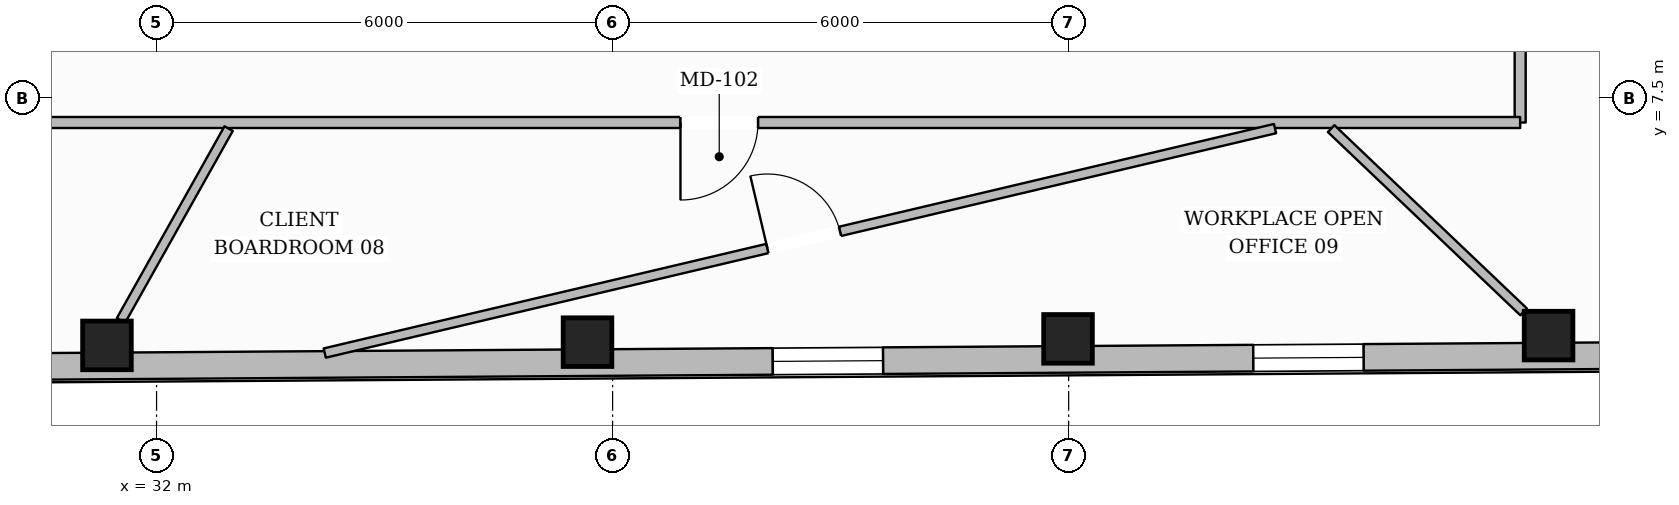
"""IFC4 building model, lengths in metres.
Left out: names, types, materials, properties, quantities, classifications, styles, units other than length and angle.
Written with IfcOpenShell. Run it as: python <this file> out.ifc"""

import sys

from ifc_helpers import new_model, si_unit, direction, frame, frame_2d, origin, origin_2d, place, context, subcontext, project, spatial, rectangle, hollow_rectangle, extrude, element, fill, save


model = new_model("IFC4")
c1 = context("Model", 3, precision=1e-05, world=origin(), true_north=direction((0.0, 1.0)))
c2 = subcontext(c1, "Body", "Model", "MODEL_VIEW")
j1 = project(units=[si_unit("LENGTHUNIT", "METRE"), si_unit("PLANEANGLEUNIT", "RADIAN")], contexts=[c1])
p1 = place(None, origin())
s1 = spatial("IfcSite", under=j1, at=p1, CompositionType="ELEMENT")
p2 = place(p1, origin())
s2 = spatial("IfcBuilding", under=s1, at=p2, CompositionType="ELEMENT")
p3 = place(p2, frame((0.0, 0.0, 211.2)))
s3 = spatial("IfcBuildingStorey", under=s2, at=p3, CompositionType="ELEMENT", Elevation=211.2)
for number, where, z_axis, x_axis in (
    (1, (31.348, 4.248, 0.0), (0.0, 0.0, 1.0), (1.0, 0.0, 0.0)),
    (2, (37.67, 4.29, 0.0), (0.0, 0.0, 1.0), (1.0, 0.0, 0.0)),
    (3, (43.992, 4.333, 0.0), (0.0, 0.0, 1.0), (1.0, 0.0, 0.0)),
    (4, (50.314, 4.376, 0.0), (0.0, 0.0, 1.0), (1.0, 0.0, 0.0)),
):
    element("IfcColumn", number, at=place(p3, frame(where, z_axis=z_axis, x_axis=x_axis)), inside=s3, PredefinedType="COLUMN", context=c2, shape_type="SweptSolid", body=[
        extrude(hollow_rectangle(XDim=0.64, YDim=0.64, WallThickness=0.028, at=origin_2d()), origin(), (0.0, 0.0, 1.0), 3.6),
    ])
p4 = place(p3, frame((57.109, 4.153, 0.0), z_axis=(0.0, 0.0, 1.0), x_axis=(-0.999976880016, -0.006799958314, 0.0)))
e5 = element("IfcWall", 5, at=p4, inside=s3, PredefinedType="STANDARD", context=c2, shape_type="SweptSolid", body=[
    extrude(rectangle(XDim=38.883, YDim=0.35, at=frame_2d((19.442, 0.0))), origin(), (0.0, 0.0, 1.0), 3.132),
])
p5 = place(p4, frame((34.519, 0.0, 0.65)))
e6 = element("IfcOpeningElement", 6, at=p5, cuts=e5, PredefinedType="OPENING", context=c2, shape_type="SweptSolid", body=[
    extrude(rectangle(XDim=1.45, YDim=1.75, at=frame_2d((0.725, 0.875))), frame((0.0, 0.185, 0.0), z_axis=(0.0, -1.0, 0.0), x_axis=(1.0, 0.0, 0.0)), (0.0, 0.0, 1.0), 0.37),
])
p6 = place(p4, frame((28.197, 0.0, 0.65)))
e7 = element("IfcOpeningElement", 7, at=p6, cuts=e5, PredefinedType="OPENING", context=c2, shape_type="SweptSolid", body=[
    extrude(rectangle(XDim=1.45, YDim=1.75, at=frame_2d((0.725, 0.875))), frame((0.0, 0.185, 0.0), z_axis=(0.0, -1.0, 0.0), x_axis=(1.0, 0.0, 0.0)), (0.0, 0.0, 1.0), 0.37),
])
p7 = place(p4, frame((15.552, 0.0, 0.65)))
e8 = element("IfcOpeningElement", 8, at=p7, cuts=e5, PredefinedType="OPENING", context=c2, shape_type="SweptSolid", body=[
    extrude(rectangle(XDim=1.45, YDim=1.75, at=frame_2d((0.725, 0.875))), frame((0.0, 0.185, 0.0), z_axis=(0.0, -1.0, 0.0), x_axis=(1.0, 0.0, 0.0)), (0.0, 0.0, 1.0), 0.37),
])
p8 = place(p4, frame((9.23, 0.0, 0.65)))
e9 = element("IfcOpeningElement", 9, at=p8, cuts=e5, PredefinedType="OPENING", context=c2, shape_type="SweptSolid", body=[
    extrude(rectangle(XDim=1.45, YDim=1.75, at=frame_2d((0.725, 0.875))), frame((0.0, 0.185, 0.0), z_axis=(0.0, -1.0, 0.0), x_axis=(1.0, 0.0, 0.0)), (0.0, 0.0, 1.0), 0.37),
])
p9 = place(p4, frame((2.908, 0.0, 0.65)))
e10 = element("IfcOpeningElement", 10, at=p9, cuts=e5, PredefinedType="OPENING", context=c2, shape_type="SweptSolid", body=[
    extrude(rectangle(XDim=1.45, YDim=1.75, at=frame_2d((0.725, 0.875))), frame((0.0, 0.185, 0.0), z_axis=(0.0, -1.0, 0.0), x_axis=(1.0, 0.0, 0.0)), (0.0, 0.0, 1.0), 0.37),
])
p10 = place(p3, frame((49.94, 15.1, 0.0), z_axis=(0.0, 0.0, 1.0), x_axis=(0.0, -1.0, 0.0)))
e11 = element("IfcWall", 11, at=p10, inside=s3, PredefinedType="PARTITIONING", context=c2, shape_type="SweptSolid", body=[
    extrude(rectangle(XDim=7.92, YDim=0.145, at=frame_2d((3.96, 0.0))), origin(), (0.0, 0.0, 1.0), 3.6),
])
p11 = place(p10, frame((3.26, 0.0, 0.0)))
e12 = element("IfcOpeningElement", 12, at=p11, cuts=e11, PredefinedType="OPENING", context=c2, shape_type="SweptSolid", body=[
    extrude(rectangle(XDim=1.4, YDim=2.2, at=frame_2d((0.7, 1.1))), frame((0.0, 0.083, 0.0), z_axis=(0.0, -1.0, 0.0), x_axis=(1.0, 0.0, 0.0)), (0.0, 0.0, 1.0), 0.165),
])
p12 = place(p3, frame((49.94, 7.18, 0.0), z_axis=(0.0, 0.0, 1.0), x_axis=(-1.0, 0.0, 0.0)))
e13 = element("IfcWall", 13, at=p12, inside=s3, PredefinedType="PARTITIONING", context=c2, shape_type="SweptSolid", body=[
    extrude(rectangle(XDim=23.88, YDim=0.145, at=frame_2d((11.94, 0.0))), origin(), (0.0, 0.0, 1.0), 3.6),
])
p13 = place(p12, frame((20.062, 0.0, 0.0)))
e14 = element("IfcOpeningElement", 14, at=p13, cuts=e13, PredefinedType="OPENING", context=c2, shape_type="SweptSolid", body=[
    extrude(rectangle(XDim=0.98, YDim=2.15, at=frame_2d((0.49, 1.075))), frame((0.0, 0.083, 0.0), z_axis=(0.0, -1.0, 0.0), x_axis=(1.0, 0.0, 0.0)), (0.0, 0.0, 1.0), 0.165),
])
p14 = place(p12, frame((10.027, 0.0, 0.0)))
e15 = element("IfcOpeningElement", 15, at=p14, cuts=e13, PredefinedType="OPENING", context=c2, shape_type="SweptSolid", body=[
    extrude(rectangle(XDim=1.02, YDim=2.15, at=frame_2d((0.51, 1.075))), frame((0.0, 0.083, 0.0), z_axis=(0.0, -1.0, 0.0), x_axis=(1.0, 0.0, 0.0)), (0.0, 0.0, 1.0), 0.165),
])
p15 = place(p3, frame((32.948, 7.1, 0.0), z_axis=(0.0, 0.0, 1.0), x_axis=(-0.489448120608, -0.872032417536, 0.0)))
e16 = element("IfcWall", 16, at=p15, inside=s3, PredefinedType="PARTITIONING", context=c2, shape_type="SweptSolid", body=[
    extrude(rectangle(XDim=2.895, YDim=0.125, at=frame_2d((1.447, 0.0))), origin(), (0.0, 0.0, 1.0), 3.6),
])
p16 = place(p3, frame((47.453, 7.1, 0.0), z_axis=(0.0, 0.0, 1.0), x_axis=(0.724245859296, -0.68954182998, 0.0)))
e17 = element("IfcWall", 17, at=p16, inside=s3, PredefinedType="PARTITIONING", context=c2, shape_type="SweptSolid", body=[
    extrude(rectangle(XDim=3.496, YDim=0.125, at=frame_2d((1.748, 0.0))), origin(), (0.0, 0.0, 1.0), 3.6),
])
p17 = place(p3, frame((34.213, 4.147, 0.0), z_axis=(0.0, 0.0, 1.0), x_axis=(0.973225904265, 0.229850689075, 0.0)))
e18 = element("IfcWall", 18, at=p17, inside=s3, PredefinedType="PARTITIONING", context=c2, shape_type="SweptSolid", body=[
    extrude(rectangle(XDim=12.846, YDim=0.125, at=frame_2d((6.423, 0.0))), origin(), (0.0, 0.0, 1.0), 3.135),
])
p18 = place(p17, frame((5.984, 0.0, 0.0)))
e19 = element("IfcOpeningElement", 19, at=p18, cuts=e18, PredefinedType="OPENING", context=c2, shape_type="SweptSolid", body=[
    extrude(rectangle(XDim=0.98, YDim=2.15, at=frame_2d((0.49, 1.075))), frame((0.0, 0.073, 0.0), z_axis=(0.0, -1.0, 0.0), x_axis=(1.0, 0.0, 0.0)), (0.0, 0.0, 1.0), 0.145),
])
p19 = place(p7, origin())
e20 = element("IfcWindow", 20, at=p19, inside=s3, PartitioningType="SINGLE_PANEL", PredefinedType="WINDOW", context=c2, shape_type="SweptSolid", body=[
    extrude(rectangle(XDim=1.45, YDim=1.75, at=frame_2d((0.725, 0.875))), frame((0.0, 0.03, 0.0), z_axis=(0.0, -1.0, 0.0), x_axis=(1.0, 0.0, 0.0)), (0.0, 0.0, 1.0), 0.06),
])
fill(e8, e20)
p20 = place(p8, origin())
e21 = element("IfcWindow", 21, at=p20, inside=s3, PartitioningType="SINGLE_PANEL", PredefinedType="WINDOW", context=c2, shape_type="SweptSolid", body=[
    extrude(rectangle(XDim=1.45, YDim=1.75, at=frame_2d((0.725, 0.875))), frame((0.0, 0.03, 0.0), z_axis=(0.0, -1.0, 0.0), x_axis=(1.0, 0.0, 0.0)), (0.0, 0.0, 1.0), 0.06),
])
fill(e9, e21)
p21 = place(p14, origin())
e22 = element("IfcDoor", 22, at=p21, inside=s3, OperationType="SINGLE_SWING_RIGHT", PredefinedType="DOOR", context=c2, shape_type="SweptSolid", body=[
    extrude(rectangle(XDim=1.02, YDim=2.15, at=frame_2d((0.51, 1.075))), frame((0.0, 0.025, 0.0), z_axis=(0.0, -1.0, 0.0), x_axis=(1.0, 0.0, 0.0)), (0.0, 0.0, 1.0), 0.05),
])
fill(e15, e22)
p22 = place(p18, origin())
e23 = element("IfcDoor", 23, at=p22, inside=s3, OperationType="SINGLE_SWING_LEFT", PredefinedType="DOOR", context=c2, shape_type="SweptSolid", body=[
    extrude(rectangle(XDim=0.98, YDim=2.15, at=frame_2d((0.49, 1.075))), frame((0.0, 0.025, 0.0), z_axis=(0.0, -1.0, 0.0), x_axis=(1.0, 0.0, 0.0)), (0.0, 0.0, 1.0), 0.05),
])
fill(e19, e23)
save(model, sys.argv[1])
